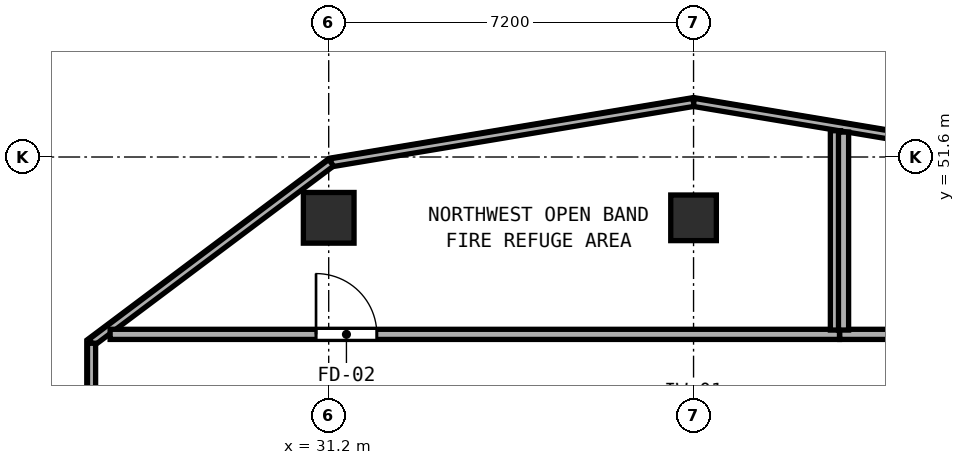
"""IFC4 building model, lengths in metres.
Left out: names, types, materials, properties, quantities, classifications, styles, units other than length and angle.
Written with IfcOpenShell. Run it as: python <this file> out.ifc"""

import sys

from ifc_helpers import new_model, si_unit, direction, frame, frame_2d, origin, origin_2d, place, context, subcontext, project, spatial, rectangle, hollow_rectangle, extrude, element, fill, save


model = new_model("IFC4")
c1 = context("Model", 3, precision=1e-05, world=origin(), true_north=direction((0.0, 1.0)))
c2 = subcontext(c1, "Body", "Model", "MODEL_VIEW")
j1 = project(units=[si_unit("LENGTHUNIT", "METRE"), si_unit("PLANEANGLEUNIT", "RADIAN")], contexts=[c1])
p1 = place(None, origin())
s1 = spatial("IfcSite", under=j1, at=p1, CompositionType="ELEMENT")
p2 = place(p1, origin())
s2 = spatial("IfcBuilding", under=s1, at=p2, CompositionType="ELEMENT")
p3 = place(p2, frame((0.0, 0.0, 160.0)))
s3 = spatial("IfcBuildingStorey", under=s2, at=p3, CompositionType="ELEMENT", Elevation=160.0)
p4 = place(p3, frame((31.2, 50.4, 0.0), z_axis=(0.0, 0.0, 1.0), x_axis=(1.0, 0.0, 0.0)))
e1 = element("IfcColumn", 1, at=p4, inside=s3, PredefinedType="COLUMN", context=c2, shape_type="SweptSolid", body=[
    extrude(hollow_rectangle(XDim=1.0, YDim=1.0, WallThickness=0.038, at=origin_2d()), origin(), (0.0, 0.0, 1.0), 4.6),
])
p5 = place(p3, frame((38.4, 50.4, 0.0), z_axis=(0.0, 0.0, 1.0), x_axis=(1.0, 0.0, 0.0)))
e2 = element("IfcColumn", 2, at=p5, inside=s3, PredefinedType="COLUMN", context=c2, shape_type="SweptSolid", body=[
    extrude(hollow_rectangle(XDim=0.9, YDim=0.9, WallThickness=0.034, at=origin_2d()), origin(), (0.0, 0.0, 1.0), 4.6),
])
p6 = place(p3, frame((45.552, 51.486, 0.0), z_axis=(0.0, 0.0, 1.0), x_axis=(-0.986394833909, 0.164393526752, 0.0)))
e3 = element("IfcWall", 3, at=p6, inside=s3, PredefinedType="PARAPET", context=c2, shape_type="SweptSolid", body=[
    extrude(rectangle(XDim=7.25, YDim=0.16, at=frame_2d((3.625, 0.0))), origin(), (0.0, 0.0, 1.0), 1.15),
])
p7 = place(p3, frame((38.4, 52.678, 0.0), z_axis=(0.0, 0.0, 1.0), x_axis=(-0.986393923832, -0.164398987305, 0.0)))
e4 = element("IfcWall", 4, at=p7, inside=s3, PredefinedType="PARAPET", context=c2, shape_type="SweptSolid", body=[
    extrude(rectangle(XDim=7.25, YDim=0.16, at=frame_2d((3.625, 0.0))), origin(), (0.0, 0.0, 1.0), 1.15),
])
p8 = place(p3, frame((31.249, 51.486, 0.0), z_axis=(0.0, 0.0, 1.0), x_axis=(-0.8, -0.6, 0.0)))
e5 = element("IfcWall", 5, at=p8, inside=s3, PredefinedType="PARAPET", context=c2, shape_type="SweptSolid", body=[
    extrude(rectangle(XDim=5.911, YDim=0.16, at=frame_2d((2.955, 0.0))), origin(), (0.0, 0.0, 1.0), 1.15),
])
p9 = place(p3, frame((26.52, 47.925, 0.0), z_axis=(0.0, 0.0, 1.0), x_axis=(0.0, -1.0, 0.0)))
e6 = element("IfcWall", 6, at=p9, inside=s3, PredefinedType="PARAPET", context=c2, shape_type="SweptSolid", body=[
    extrude(rectangle(XDim=1.245, YDim=0.16, at=frame_2d((0.623, 0.0))), origin(), (0.0, 0.0, 1.0), 1.15),
])
p10 = place(p3, frame((26.887, 48.1, 0.0), z_axis=(0.0, 0.0, 1.0), x_axis=(1.0, 0.0, 0.0)))
e7 = element("IfcWall", 7, at=p10, inside=s3, PredefinedType="SOLIDWALL", context=c2, shape_type="SweptSolid", body=[
    extrude(rectangle(XDim=14.393, YDim=0.2, at=frame_2d((7.197, 0.0))), origin(), (0.0, 0.0, 1.0), 4.35),
])
p11 = place(p10, frame((4.063, 0.0, 0.0)))
e8 = element("IfcOpeningElement", 8, at=p11, cuts=e7, PredefinedType="OPENING", context=c2, shape_type="SweptSolid", body=[
    extrude(rectangle(XDim=1.2, YDim=2.15, at=frame_2d((0.6, 1.075))), frame((0.0, 0.11, 0.0), z_axis=(0.0, -1.0, 0.0), x_axis=(1.0, 0.0, 0.0)), (0.0, 0.0, 1.0), 0.22),
])
p12 = place(p3, frame((41.2, 48.185, 0.0), z_axis=(0.0, 0.0, 1.0), x_axis=(0.0, 1.0, 0.0)))
e9 = element("IfcWall", 9, at=p12, inside=s3, PredefinedType="SOLIDWALL", context=c2, shape_type="SweptSolid", body=[
    extrude(rectangle(XDim=3.933, YDim=0.2, at=frame_2d((1.967, 0.0))), origin(), (0.0, 0.0, 1.0), 4.35),
])
p13 = place(p3, frame((41.285, 48.1, 0.0), z_axis=(0.0, 0.0, 1.0), x_axis=(1.0, 0.0, 0.0)))
e10 = element("IfcWall", 10, at=p13, inside=s3, PredefinedType="SOLIDWALL", context=c2, shape_type="SweptSolid", body=[
    extrude(rectangle(XDim=8.628, YDim=0.2, at=frame_2d((4.314, 0.0))), origin(), (0.0, 0.0, 1.0), 4.35),
])
p14 = place(p13, frame((2.195, 0.0, 0.0)))
e11 = element("IfcOpeningElement", 11, at=p14, cuts=e10, PredefinedType="OPENING", context=c2, shape_type="SweptSolid", body=[
    extrude(rectangle(XDim=1.2, YDim=2.15, at=frame_2d((0.6, 1.075))), frame((0.0, 0.11, 0.0), z_axis=(0.0, -1.0, 0.0), x_axis=(1.0, 0.0, 0.0)), (0.0, 0.0, 1.0), 0.22),
])
p15 = place(p3, frame((41.36, 48.185, 0.0), z_axis=(0.0, 0.0, 1.0), x_axis=(0.0, 1.0, 0.0)))
e12 = element("IfcWall", 12, at=p15, inside=s3, PredefinedType="SOLIDWALL", context=c2, shape_type="SweptSolid", body=[
    extrude(rectangle(XDim=3.907, YDim=0.2, at=frame_2d((1.953, 0.0))), origin(), (0.0, 0.0, 1.0), 4.35),
])
p16 = place(p11, origin())
e13 = element("IfcDoor", 13, at=p16, inside=s3, OperationType="SINGLE_SWING_LEFT", PredefinedType="DOOR", context=c2, shape_type="SweptSolid", body=[
    extrude(rectangle(XDim=1.2, YDim=2.15, at=frame_2d((0.6, 1.075))), frame((0.0, 0.025, 0.0), z_axis=(0.0, -1.0, 0.0), x_axis=(1.0, 0.0, 0.0)), (0.0, 0.0, 1.0), 0.05),
])
fill(e8, e13)
save(model, sys.argv[1])
